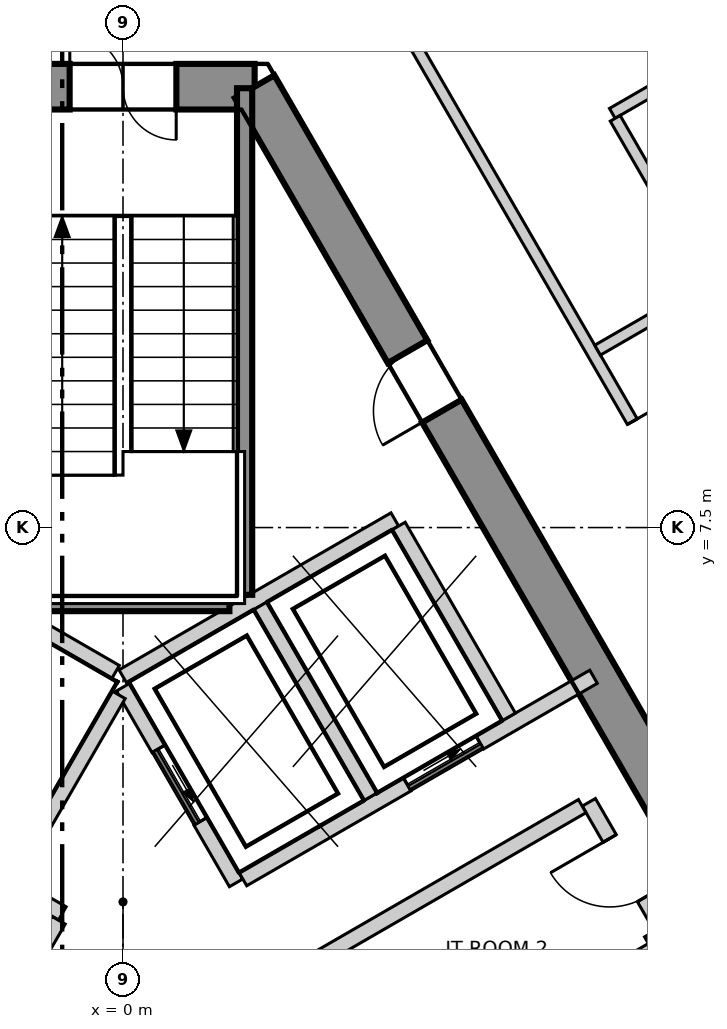
"""IFC4 building model, lengths in metres.
Left out: names, types, materials, properties, quantities, classifications, styles, units other than length and angle.
Written with IfcOpenShell. Run it as: python <this file> out.ifc"""

import sys

from ifc_helpers import new_model, si_unit, direction, frame, frame_2d, origin, place, context, subcontext, project, spatial, polyline, rectangle, outline, extrude, element, fill, save


model = new_model("IFC4")
c1 = context("Model", 3, precision=1e-05, world=origin(), true_north=direction((0.0, 1.0)))
c2 = subcontext(c1, "Body", "Model", "MODEL_VIEW")
j1 = project(units=[si_unit("LENGTHUNIT", "METRE"), si_unit("PLANEANGLEUNIT", "RADIAN")], contexts=[c1])
p1 = place(None, origin())
s1 = spatial("IfcSite", under=j1, at=p1, CompositionType="ELEMENT")
p2 = place(p1, origin())
s2 = spatial("IfcBuilding", under=s1, at=p2, CompositionType="ELEMENT")
p3 = place(p2, frame((0.0, 0.0, 289.9)))
s3 = spatial("IfcBuildingStorey", under=s2, at=p3, CompositionType="ELEMENT", Elevation=289.9)
p4 = place(p3, frame((1.732, 13.3, -0.3), z_axis=(0.0, 0.0, 1.0), x_axis=(-1.0, 0.0, 0.0)))
e1 = element("IfcWall", 1, at=p4, inside=s3, PredefinedType="SHEAR", context=c2, shape_type="SweptSolid", body=[
    extrude(outline(polyline([(-0.173, -0.3), (1.732, -0.3), (3.637, -0.3), (3.291, 0.3), (1.732, 0.3), (0.173, 0.3), (-0.173, -0.3)])), origin(), (0.0, 0.0, 1.0), 3.6),
])
p5 = place(p4, frame((1.032, 0.0, 0.3)))
e2 = element("IfcOpeningElement", 2, at=p5, cuts=e1, PredefinedType="OPENING", context=c2, shape_type="SweptSolid", body=[
    extrude(rectangle(XDim=1.4, YDim=2.1, at=frame_2d((0.7, 1.05))), frame((0.0, 0.31, 0.0), z_axis=(0.0, -1.0, 0.0), x_axis=(1.0, 0.0, 0.0)), (0.0, 0.0, 1.0), 0.62),
])
p6 = place(p3, frame((12.384, -5.15, -0.3), z_axis=(0.0, 0.0, 1.0), x_axis=(-0.500000539815, 0.866025092122, 0.0)))
e3 = element("IfcWall", 3, at=p6, inside=s3, PredefinedType="SHEAR", context=c2, shape_type="SweptSolid", body=[
    extrude(outline(polyline([(-0.173, -0.301), (1.795, -0.301), (3.763, -0.301), (5.731, -0.301), (7.7, -0.301), (9.668, -0.301), (11.636, -0.301), (13.604, -0.3), (15.573, -0.3), (17.541, -0.3), (19.509, -0.3), (21.477, -0.3), (21.131, 0.3), (19.226, 0.3), (17.321, 0.3), (15.415, 0.3), (13.51, 0.3), (11.605, 0.3), (9.699, 0.3), (7.794, 0.3), (5.889, 0.3), (3.984, 0.3), (2.078, 0.3), (0.173, 0.3), (-0.173, -0.301)])), origin(), (0.0, 0.0, 1.0), 3.6),
])
p7 = place(p6, frame((16.378, 0.0, 0.3)))
e4 = element("IfcOpeningElement", 4, at=p7, cuts=e3, PredefinedType="OPENING", context=c2, shape_type="SweptSolid", body=[
    extrude(rectangle(XDim=0.9, YDim=2.1, at=frame_2d((0.45, 1.05))), frame((0.0, 0.31, 0.0), z_axis=(0.0, -1.0, 0.0), x_axis=(1.0, 0.0, 0.0)), (0.0, 0.0, 1.0), 0.621),
])
p8 = place(p6, frame((4.026, 0.0, 0.3)))
e5 = element("IfcOpeningElement", 5, at=p8, cuts=e3, PredefinedType="OPENING", context=c2, shape_type="SweptSolid", body=[
    extrude(rectangle(XDim=0.9, YDim=2.1, at=frame_2d((0.45, 1.05))), frame((0.0, 0.31, 0.0), z_axis=(0.0, -1.0, 0.0), x_axis=(1.0, 0.0, 0.0)), (0.0, 0.0, 1.0), 0.621),
])
p9 = place(p3, frame((25.375, -11.77, 0.0), z_axis=(0.0, 0.0, 1.0), x_axis=(-0.500008134474, 0.866020707292, 0.0)))
e6 = element("IfcWall", 6, at=p9, inside=s3, PredefinedType="ELEMENTEDWALL", context=c2, shape_type="SweptSolid", body=[
    extrude(rectangle(XDim=45.741, YDim=0.2, at=frame_2d((22.871, 0.0))), origin(), (0.0, 0.0, 1.0), 3.3),
])
p10 = place(p9, frame((2.15, 0.0, 0.9)))
e7 = element("IfcOpeningElement", 7, at=p10, cuts=e6, PredefinedType="OPENING", context=c2, shape_type="SweptSolid", body=[
    extrude(rectangle(XDim=3.7, YDim=2.2, at=frame_2d((1.85, 1.1))), frame((0.0, 0.11, 0.0), z_axis=(0.0, -1.0, 0.0), x_axis=(1.0, 0.0, 0.0)), (0.0, 0.0, 1.0), 0.22),
])
p11 = place(p9, frame((7.544, 0.0, 0.9)))
e8 = element("IfcOpeningElement", 8, at=p11, cuts=e6, PredefinedType="OPENING", context=c2, shape_type="SweptSolid", body=[
    extrude(rectangle(XDim=3.7, YDim=2.2, at=frame_2d((1.85, 1.1))), frame((0.0, 0.11, 0.0), z_axis=(0.0, -1.0, 0.0), x_axis=(1.0, 0.0, 0.0)), (0.0, 0.0, 1.0), 0.22),
])
p12 = place(p9, frame((12.939, 0.0, 0.9)))
e9 = element("IfcOpeningElement", 9, at=p12, cuts=e6, PredefinedType="OPENING", context=c2, shape_type="SweptSolid", body=[
    extrude(rectangle(XDim=3.7, YDim=2.2, at=frame_2d((1.85, 1.1))), frame((0.0, 0.11, 0.0), z_axis=(0.0, -1.0, 0.0), x_axis=(1.0, 0.0, 0.0)), (0.0, 0.0, 1.0), 0.22),
])
p13 = place(p9, frame((18.333, 0.0, 0.9)))
e10 = element("IfcOpeningElement", 10, at=p13, cuts=e6, PredefinedType="OPENING", context=c2, shape_type="SweptSolid", body=[
    extrude(rectangle(XDim=3.7, YDim=2.2, at=frame_2d((1.85, 1.1))), frame((0.0, 0.11, 0.0), z_axis=(0.0, -1.0, 0.0), x_axis=(1.0, 0.0, 0.0)), (0.0, 0.0, 1.0), 0.22),
])
p14 = place(p9, frame((23.728, 0.0, 0.9)))
e11 = element("IfcOpeningElement", 11, at=p14, cuts=e6, PredefinedType="OPENING", context=c2, shape_type="SweptSolid", body=[
    extrude(rectangle(XDim=3.7, YDim=2.2, at=frame_2d((1.85, 1.1))), frame((0.0, 0.11, 0.0), z_axis=(0.0, -1.0, 0.0), x_axis=(1.0, 0.0, 0.0)), (0.0, 0.0, 1.0), 0.22),
])
p15 = place(p9, frame((29.122, 0.0, 0.9)))
e12 = element("IfcOpeningElement", 12, at=p15, cuts=e6, PredefinedType="OPENING", context=c2, shape_type="SweptSolid", body=[
    extrude(rectangle(XDim=3.7, YDim=2.2, at=frame_2d((1.85, 1.1))), frame((0.0, 0.11, 0.0), z_axis=(0.0, -1.0, 0.0), x_axis=(1.0, 0.0, 0.0)), (0.0, 0.0, 1.0), 0.22),
])
p16 = place(p9, frame((34.517, 0.0, 0.9)))
e13 = element("IfcOpeningElement", 13, at=p16, cuts=e6, PredefinedType="OPENING", context=c2, shape_type="SweptSolid", body=[
    extrude(rectangle(XDim=3.7, YDim=2.2, at=frame_2d((1.85, 1.1))), frame((0.0, 0.11, 0.0), z_axis=(0.0, -1.0, 0.0), x_axis=(1.0, 0.0, 0.0)), (0.0, 0.0, 1.0), 0.22),
])
p17 = place(p9, frame((39.911, 0.0, 0.9)))
e14 = element("IfcOpeningElement", 14, at=p17, cuts=e6, PredefinedType="OPENING", context=c2, shape_type="SweptSolid", body=[
    extrude(rectangle(XDim=3.7, YDim=2.2, at=frame_2d((1.85, 1.1))), frame((0.0, 0.11, 0.0), z_axis=(0.0, -1.0, 0.0), x_axis=(1.0, 0.0, 0.0)), (0.0, 0.0, 1.0), 0.22),
])
p18 = place(p3, frame((-17.679, -10.12, 0.0), z_axis=(0.0, 0.0, 1.0), x_axis=(0.500008955215, 0.866020233427, 0.0)))
e15 = element("IfcWall", 15, at=p18, inside=s3, PredefinedType="PARTITIONING", context=c2, shape_type="SweptSolid", body=[
    extrude(rectangle(XDim=35.357, YDim=0.15, at=frame_2d((17.679, 0.0))), origin(), (0.0, 0.0, 1.0), 3.3),
])
p19 = place(p18, frame((31.407, 0.0, 0.0)))
e16 = element("IfcOpeningElement", 16, at=p19, cuts=e15, PredefinedType="OPENING", context=c2, shape_type="SweptSolid", body=[
    extrude(rectangle(XDim=1.0, YDim=2.1, at=frame_2d((0.5, 1.05))), frame((0.0, 0.085, 0.0), z_axis=(0.0, -1.0, 0.0), x_axis=(1.0, 0.0, 0.0)), (0.0, 0.0, 1.0), 0.17),
])
p20 = place(p18, frame((25.642, 0.0, 0.0)))
e17 = element("IfcOpeningElement", 17, at=p20, cuts=e15, PredefinedType="OPENING", context=c2, shape_type="SweptSolid", body=[
    extrude(rectangle(XDim=1.0, YDim=2.1, at=frame_2d((0.5, 1.05))), frame((0.0, 0.085, 0.0), z_axis=(0.0, -1.0, 0.0), x_axis=(1.0, 0.0, 0.0)), (0.0, 0.0, 1.0), 0.17),
])
p21 = place(p18, frame((18.348, 0.0, 0.0)))
e18 = element("IfcOpeningElement", 18, at=p21, cuts=e15, PredefinedType="OPENING", context=c2, shape_type="SweptSolid", body=[
    extrude(rectangle(XDim=1.0, YDim=2.1, at=frame_2d((0.5, 1.05))), frame((0.0, 0.085, 0.0), z_axis=(0.0, -1.0, 0.0), x_axis=(1.0, 0.0, 0.0)), (0.0, 0.0, 1.0), 0.17),
])
p22 = place(p18, frame((13.254, 0.0, 0.0)))
e19 = element("IfcOpeningElement", 19, at=p22, cuts=e15, PredefinedType="OPENING", context=c2, shape_type="SweptSolid", body=[
    extrude(rectangle(XDim=1.0, YDim=2.1, at=frame_2d((0.5, 1.05))), frame((0.0, 0.085, 0.0), z_axis=(0.0, -1.0, 0.0), x_axis=(1.0, 0.0, 0.0)), (0.0, 0.0, 1.0), 0.17),
])
p23 = place(p18, frame((7.559, 0.0, 0.0)))
e20 = element("IfcOpeningElement", 20, at=p23, cuts=e15, PredefinedType="OPENING", context=c2, shape_type="SweptSolid", body=[
    extrude(rectangle(XDim=1.0, YDim=2.1, at=frame_2d((0.5, 1.05))), frame((0.0, 0.085, 0.0), z_axis=(0.0, -1.0, 0.0), x_axis=(1.0, 0.0, 0.0)), (0.0, 0.0, 1.0), 0.17),
])
p24 = place(p18, frame((2.865, 0.0, 0.0)))
e21 = element("IfcOpeningElement", 21, at=p24, cuts=e15, PredefinedType="OPENING", context=c2, shape_type="SweptSolid", body=[
    extrude(rectangle(XDim=1.0, YDim=2.1, at=frame_2d((0.5, 1.05))), frame((0.0, 0.085, 0.0), z_axis=(0.0, -1.0, 0.0), x_axis=(1.0, 0.0, 0.0)), (0.0, 0.0, 1.0), 0.17),
])
p25 = place(p3, frame((0.075, 20.37, 0.0), z_axis=(0.0, 0.0, 1.0), x_axis=(0.500009775255, -0.866019759965, 0.0)))
e22 = element("IfcWall", 22, at=p25, inside=s3, PredefinedType="PARTITIONING", context=c2, shape_type="SweptSolid", body=[
    extrude(rectangle(XDim=35.207, YDim=0.15, at=frame_2d((17.604, 0.0))), origin(), (0.0, 0.0, 1.0), 3.3),
])
p26 = place(p25, frame((31.407, 0.0, 0.0)))
e23 = element("IfcOpeningElement", 23, at=p26, cuts=e22, PredefinedType="OPENING", context=c2, shape_type="SweptSolid", body=[
    extrude(rectangle(XDim=1.0, YDim=2.1, at=frame_2d((0.5, 1.05))), frame((0.0, 0.085, 0.0), z_axis=(0.0, -1.0, 0.0), x_axis=(1.0, 0.0, 0.0)), (0.0, 0.0, 1.0), 0.17),
])
p27 = place(p25, frame((19.243, 0.0, 0.0)))
e24 = element("IfcOpeningElement", 24, at=p27, cuts=e22, PredefinedType="OPENING", context=c2, shape_type="SweptSolid", body=[
    extrude(rectangle(XDim=1.0, YDim=2.1, at=frame_2d((0.5, 1.05))), frame((0.0, 0.085, 0.0), z_axis=(0.0, -1.0, 0.0), x_axis=(1.0, 0.0, 0.0)), (0.0, 0.0, 1.0), 0.17),
])
p28 = place(p25, frame((24.543, 0.0, 0.0)))
e25 = element("IfcOpeningElement", 25, at=p28, cuts=e22, PredefinedType="OPENING", context=c2, shape_type="SweptSolid", body=[
    extrude(rectangle(XDim=0.9, YDim=2.1, at=frame_2d((0.45, 1.05))), frame((0.0, 0.085, 0.0), z_axis=(0.0, -1.0, 0.0), x_axis=(1.0, 0.0, 0.0)), (0.0, 0.0, 1.0), 0.17),
])
p29 = place(p25, frame((22.443, 0.0, 0.0)))
e26 = element("IfcOpeningElement", 26, at=p29, cuts=e22, PredefinedType="OPENING", context=c2, shape_type="SweptSolid", body=[
    extrude(rectangle(XDim=0.9, YDim=2.1, at=frame_2d((0.45, 1.05))), frame((0.0, 0.085, 0.0), z_axis=(0.0, -1.0, 0.0), x_axis=(1.0, 0.0, 0.0)), (0.0, 0.0, 1.0), 0.17),
])
p30 = place(p25, frame((13.253, 0.0, 0.0)))
e27 = element("IfcOpeningElement", 27, at=p30, cuts=e22, PredefinedType="OPENING", context=c2, shape_type="SweptSolid", body=[
    extrude(rectangle(XDim=1.0, YDim=2.1, at=frame_2d((0.5, 1.05))), frame((0.0, 0.085, 0.0), z_axis=(0.0, -1.0, 0.0), x_axis=(1.0, 0.0, 0.0)), (0.0, 0.0, 1.0), 0.17),
])
p31 = place(p25, frame((5.559, 0.0, 0.0)))
e28 = element("IfcOpeningElement", 28, at=p31, cuts=e22, PredefinedType="OPENING", context=c2, shape_type="SweptSolid", body=[
    extrude(rectangle(XDim=1.0, YDim=2.1, at=frame_2d((0.5, 1.05))), frame((0.0, 0.085, 0.0), z_axis=(0.0, -1.0, 0.0), x_axis=(1.0, 0.0, 0.0)), (0.0, 0.0, 1.0), 0.17),
])
p32 = place(p3, frame((6.244, 9.834, 0.0), z_axis=(0.0, 0.0, 1.0), x_axis=(0.866017549727, 0.50001360338, 0.0)))
e29 = element("IfcWall", 29, at=p32, inside=s3, PredefinedType="PARTITIONING", context=c2, shape_type="SweptSolid", body=[
    extrude(rectangle(XDim=5.686, YDim=0.15, at=frame_2d((2.843, 0.0))), origin(), (0.0, 0.0, 1.0), 3.3),
])
p33 = place(p3, frame((6.438, 12.949, 0.0), z_axis=(0.0, 0.0, 1.0), x_axis=(0.866107001057, 0.499858642738, 0.0)))
e30 = element("IfcWall", 30, at=p33, inside=s3, PredefinedType="PARTITIONING", context=c2, shape_type="SweptSolid", body=[
    extrude(rectangle(XDim=2.845, YDim=0.15, at=frame_2d((1.422, 0.0))), origin(), (0.0, 0.0, 1.0), 3.3),
])
p34 = place(p33, frame((1.05, 0.0, 0.0)))
e31 = element("IfcOpeningElement", 31, at=p34, cuts=e30, PredefinedType="OPENING", context=c2, shape_type="SweptSolid", body=[
    extrude(rectangle(XDim=0.9, YDim=2.1, at=frame_2d((0.45, 1.05))), frame((0.0, 0.085, 0.0), z_axis=(0.0, -1.0, 0.0), x_axis=(1.0, 0.0, 0.0)), (0.0, 0.0, 1.0), 0.17),
])
p35 = place(p3, frame((6.476, 12.884, 0.0), z_axis=(0.0, 0.0, 1.0), x_axis=(0.499900713578, -0.866082719239, 0.0)))
e32 = element("IfcWall", 32, at=p35, inside=s3, PredefinedType="PARTITIONING", context=c2, shape_type="SweptSolid", body=[
    extrude(rectangle(XDim=2.45, YDim=0.15, at=frame_2d((1.225, 0.0))), origin(), (0.0, 0.0, 1.0), 3.3),
])
p36 = place(p3, frame((-0.002, 5.541, 0.0), z_axis=(0.0, 0.0, 1.0), x_axis=(0.86600155993, 0.500041296494, 0.0)))
e33 = element("IfcWall", 33, at=p36, inside=s3, PredefinedType="SOLIDWALL", context=c2, shape_type="SweptSolid", body=[
    extrude(rectangle(XDim=4.132, YDim=0.2, at=frame_2d((2.066, 0.0))), origin(), (0.0, 0.0, 1.0), 3.3),
])
p37 = place(p3, frame((0.0, 5.4, 0.0), z_axis=(0.0, 0.0, 1.0), x_axis=(0.500103862429, -0.865965430478, 0.0)))
e34 = element("IfcWall", 34, at=p37, inside=s3, PredefinedType="SOLIDWALL", context=c2, shape_type="SweptSolid", body=[
    extrude(rectangle(XDim=2.973, YDim=0.2, at=frame_2d((1.487, 0.0))), origin(), (0.0, 0.0, 1.0), 3.3),
])
p38 = place(p37, frame((0.937, 0.0, 0.0)))
e35 = element("IfcOpeningElement", 35, at=p38, cuts=e34, PredefinedType="OPENING", context=c2, shape_type="SweptSolid", body=[
    extrude(rectangle(XDim=1.1, YDim=2.1, at=frame_2d((0.55, 1.05))), frame((0.0, 0.11, 0.0), z_axis=(0.0, -1.0, 0.0), x_axis=(1.0, 0.0, 0.0)), (0.0, 0.0, 1.0), 0.22),
])
p39 = place(p3, frame((1.578, 2.874, 0.0), z_axis=(0.0, 0.0, 1.0), x_axis=(0.866045911672, 0.499964477614, 0.0)))
e36 = element("IfcWall", 36, at=p39, inside=s3, PredefinedType="SOLIDWALL", context=c2, shape_type="SweptSolid", body=[
    extrude(rectangle(XDim=5.327, YDim=0.2, at=frame_2d((2.663, 0.0))), origin(), (0.0, 0.0, 1.0), 3.3),
])
p40 = place(p39, frame((2.496, 0.0, 0.0)))
e37 = element("IfcOpeningElement", 37, at=p40, cuts=e36, PredefinedType="OPENING", context=c2, shape_type="SweptSolid", body=[
    extrude(rectangle(XDim=1.1, YDim=2.1, at=frame_2d((0.55, 1.05))), frame((0.0, 0.11, 0.0), z_axis=(0.0, -1.0, 0.0), x_axis=(1.0, 0.0, 0.0)), (0.0, 0.0, 1.0), 0.22),
])
for number, where, z_axis, x_axis in (
    (38, (3.626, 7.52, 0.0), (0.0, 0.0, 1.0), (0.5, -0.866, 0.0)),
    (39, (1.807, 6.47, 0.0), (0.0, 0.0, 1.0), (0.5, -0.866, 0.0)),
):
    element("IfcWall", number, at=place(p3, frame(where, z_axis=z_axis, x_axis=x_axis)), inside=s3, PredefinedType="SOLIDWALL", context=c2, shape_type="SweptSolid", body=[
        extrude(rectangle(XDim=2.9, YDim=0.2, at=frame_2d((1.45, 0.0))), origin(), (0.0, 0.0, 1.0), 3.3),
    ])
p41 = place(p3, frame((6.129, 3.885, 0.0), z_axis=(0.0, 0.0, 1.0), x_axis=(0.499952260202, -0.866052964615, 0.0)))
e40 = element("IfcWall", 40, at=p41, inside=s3, PredefinedType="SOLIDWALL", context=c2, shape_type="SweptSolid", body=[
    extrude(rectangle(XDim=1.901, YDim=0.2, at=frame_2d((0.95, 0.0))), origin(), (0.0, 0.0, 1.0), 3.3),
])
p42 = place(p41, frame((0.55, 0.0, 0.0)))
e41 = element("IfcOpeningElement", 41, at=p42, cuts=e40, PredefinedType="OPENING", context=c2, shape_type="SweptSolid", body=[
    extrude(rectangle(XDim=0.9, YDim=2.1, at=frame_2d((0.45, 1.05))), frame((0.0, 0.11, 0.0), z_axis=(0.0, -1.0, 0.0), x_axis=(1.0, 0.0, 0.0)), (0.0, 0.0, 1.0), 0.22),
])
p43 = place(p3, frame((2.275, 1.66, 0.0), z_axis=(0.0, 0.0, 1.0), x_axis=(0.866013608182, 0.500020430026, 0.0)))
e42 = element("IfcWall", 42, at=p43, inside=s3, PredefinedType="SOLIDWALL", context=c2, shape_type="SweptSolid", body=[
    extrude(rectangle(XDim=4.35, YDim=0.2, at=frame_2d((2.175, 0.0))), origin(), (0.0, 0.0, 1.0), 3.3),
])
p44 = place(p3, frame((-1.488, 2.822, 0.0), z_axis=(0.0, 0.0, 1.0), x_axis=(0.866236612152, -0.499633997809, 0.0)))
e43 = element("IfcWall", 43, at=p44, inside=s3, PredefinedType="SOLIDWALL", context=c2, shape_type="SweptSolid", body=[
    extrude(rectangle(XDim=0.796, YDim=0.2, at=frame_2d((0.398, 0.0))), origin(), (0.0, 0.0, 1.0), 3.3),
])
p45 = place(p3, frame((-2.444, -0.433, 0.0), z_axis=(0.0, 0.0, 1.0), x_axis=(0.500035624827, 0.866004834804, 0.0)))
e44 = element("IfcWall", 44, at=p45, inside=s3, PredefinedType="SOLIDWALL", context=c2, shape_type="SweptSolid", body=[
    extrude(rectangle(XDim=3.194, YDim=0.2, at=frame_2d((1.597, 0.0))), origin(), (0.0, 0.0, 1.0), 3.3),
])
p46 = place(p3, frame((-1.67, 6.507, 0.0), z_axis=(0.0, 0.0, 1.0), x_axis=(0.865941441609, -0.500145398563, 0.0)))
e45 = element("IfcWall", 45, at=p46, inside=s3, PredefinedType="SOLIDWALL", context=c2, shape_type="SweptSolid", body=[
    extrude(rectangle(XDim=1.815, YDim=0.2, at=frame_2d((0.908, 0.0))), origin(), (0.0, 0.0, 1.0), 3.3),
])
p47 = place(p3, frame((-1.438, 2.909, 0.0), z_axis=(0.0, 0.0, 1.0), x_axis=(0.499829630636, 0.866123744241, 0.0)))
e46 = element("IfcWall", 46, at=p47, inside=s3, PredefinedType="SOLIDWALL", context=c2, shape_type="SweptSolid", body=[
    extrude(rectangle(XDim=2.761, YDim=0.2, at=frame_2d((1.38, 0.0))), origin(), (0.0, 0.0, 1.0), 3.3),
])
p48 = place(p3, frame((6.826, 1.978, 0.0), z_axis=(0.0, 0.0, 1.0), x_axis=(0.499990139034, -0.866031096941, 0.0)))
e47 = element("IfcWall", 47, at=p48, inside=s3, PredefinedType="SOLIDWALL", context=c2, shape_type="SweptSolid", body=[
    extrude(rectangle(XDim=3.0, YDim=0.2, at=frame_2d((1.5, 0.0))), origin(), (0.0, 0.0, 1.0), 3.3),
])
p49 = place(p3, frame((6.912, 2.028, 0.0), z_axis=(0.0, 0.0, 1.0), x_axis=(0.866559367082, 0.499074005857, 0.0)))
e48 = element("IfcWall", 48, at=p49, inside=s3, PredefinedType="SOLIDWALL", context=c2, shape_type="SweptSolid", body=[
    extrude(rectangle(XDim=0.152, YDim=0.2, at=frame_2d((0.076, 0.0))), origin(), (0.0, 0.0, 1.0), 3.3),
])
p50 = place(p3, frame((1.6, 6.615, 0.0), z_axis=(0.0, 0.0, 1.0), x_axis=(0.0, 1.0, 0.0)))
e49 = element("IfcWall", 49, at=p50, inside=s3, PredefinedType="SOLIDWALL", context=c2, shape_type="SweptSolid", body=[
    extrude(rectangle(XDim=6.665, YDim=0.2, at=frame_2d((3.333, 0.0))), origin(), (0.0, 0.0, 1.0), 3.3),
])
p51 = place(p3, frame((-1.4, 6.5, 0.0), z_axis=(0.0, 0.0, 1.0), x_axis=(1.0, 0.0, 0.0)))
e50 = element("IfcWall", 50, at=p51, inside=s3, PredefinedType="SOLIDWALL", context=c2, shape_type="SweptSolid", body=[
    extrude(rectangle(XDim=2.8, YDim=0.2, at=frame_2d((1.4, 0.0))), origin(), (0.0, 0.0, 1.0), 3.3),
])
p52 = place(p38, origin())
e51 = element("IfcDoor", 51, at=p52, inside=s3, OperationType="SLIDING_TO_LEFT", PredefinedType="DOOR", context=c2, shape_type="SweptSolid", body=[
    extrude(rectangle(XDim=1.1, YDim=2.1, at=frame_2d((0.55, 1.05))), frame((0.0, 0.025, 0.0), z_axis=(0.0, -1.0, 0.0), x_axis=(1.0, 0.0, 0.0)), (0.0, 0.0, 1.0), 0.05),
])
fill(e35, e51)
p53 = place(p40, origin())
e52 = element("IfcDoor", 52, at=p53, inside=s3, OperationType="SLIDING_TO_LEFT", PredefinedType="DOOR", context=c2, shape_type="SweptSolid", body=[
    extrude(rectangle(XDim=1.1, YDim=2.1, at=frame_2d((0.55, 1.05))), frame((0.0, 0.025, 0.0), z_axis=(0.0, -1.0, 0.0), x_axis=(1.0, 0.0, 0.0)), (0.0, 0.0, 1.0), 0.05),
])
fill(e37, e52)
p54 = place(p30, origin())
e53 = element("IfcDoor", 53, at=p54, inside=s3, OperationType="SINGLE_SWING_RIGHT", PredefinedType="DOOR", context=c2, shape_type="SweptSolid", body=[
    extrude(rectangle(XDim=1.0, YDim=2.1, at=frame_2d((0.5, 1.05))), frame((0.0, 0.025, 0.0), z_axis=(0.0, -1.0, 0.0), x_axis=(1.0, 0.0, 0.0)), (0.0, 0.0, 1.0), 0.05),
])
fill(e27, e53)
p55 = place(p5, origin())
e54 = element("IfcDoor", 54, at=p55, inside=s3, OperationType="DOUBLE_DOOR_SINGLE_SWING", PredefinedType="DOOR", context=c2, shape_type="SweptSolid", body=[
    extrude(rectangle(XDim=1.4, YDim=2.1, at=frame_2d((0.7, 1.05))), frame((0.0, 0.025, 0.0), z_axis=(0.0, -1.0, 0.0), x_axis=(1.0, 0.0, 0.0)), (0.0, 0.0, 1.0), 0.05),
])
fill(e2, e54)
p56 = place(p7, origin())
e55 = element("IfcDoor", 55, at=p56, inside=s3, OperationType="SINGLE_SWING_RIGHT", PredefinedType="DOOR", context=c2, shape_type="SweptSolid", body=[
    extrude(rectangle(XDim=0.9, YDim=2.1, at=frame_2d((0.45, 1.05))), frame((0.0, 0.025, 0.0), z_axis=(0.0, -1.0, 0.0), x_axis=(1.0, 0.0, 0.0)), (0.0, 0.0, 1.0), 0.05),
])
fill(e4, e55)
p57 = place(p42, origin())
e56 = element("IfcDoor", 56, at=p57, inside=s3, OperationType="SINGLE_SWING_LEFT", PredefinedType="DOOR", context=c2, shape_type="SweptSolid", body=[
    extrude(rectangle(XDim=0.9, YDim=2.1, at=frame_2d((0.45, 1.05))), frame((0.0, 0.025, 0.0), z_axis=(0.0, -1.0, 0.0), x_axis=(1.0, 0.0, 0.0)), (0.0, 0.0, 1.0), 0.05),
])
fill(e41, e56)
save(model, sys.argv[1])
